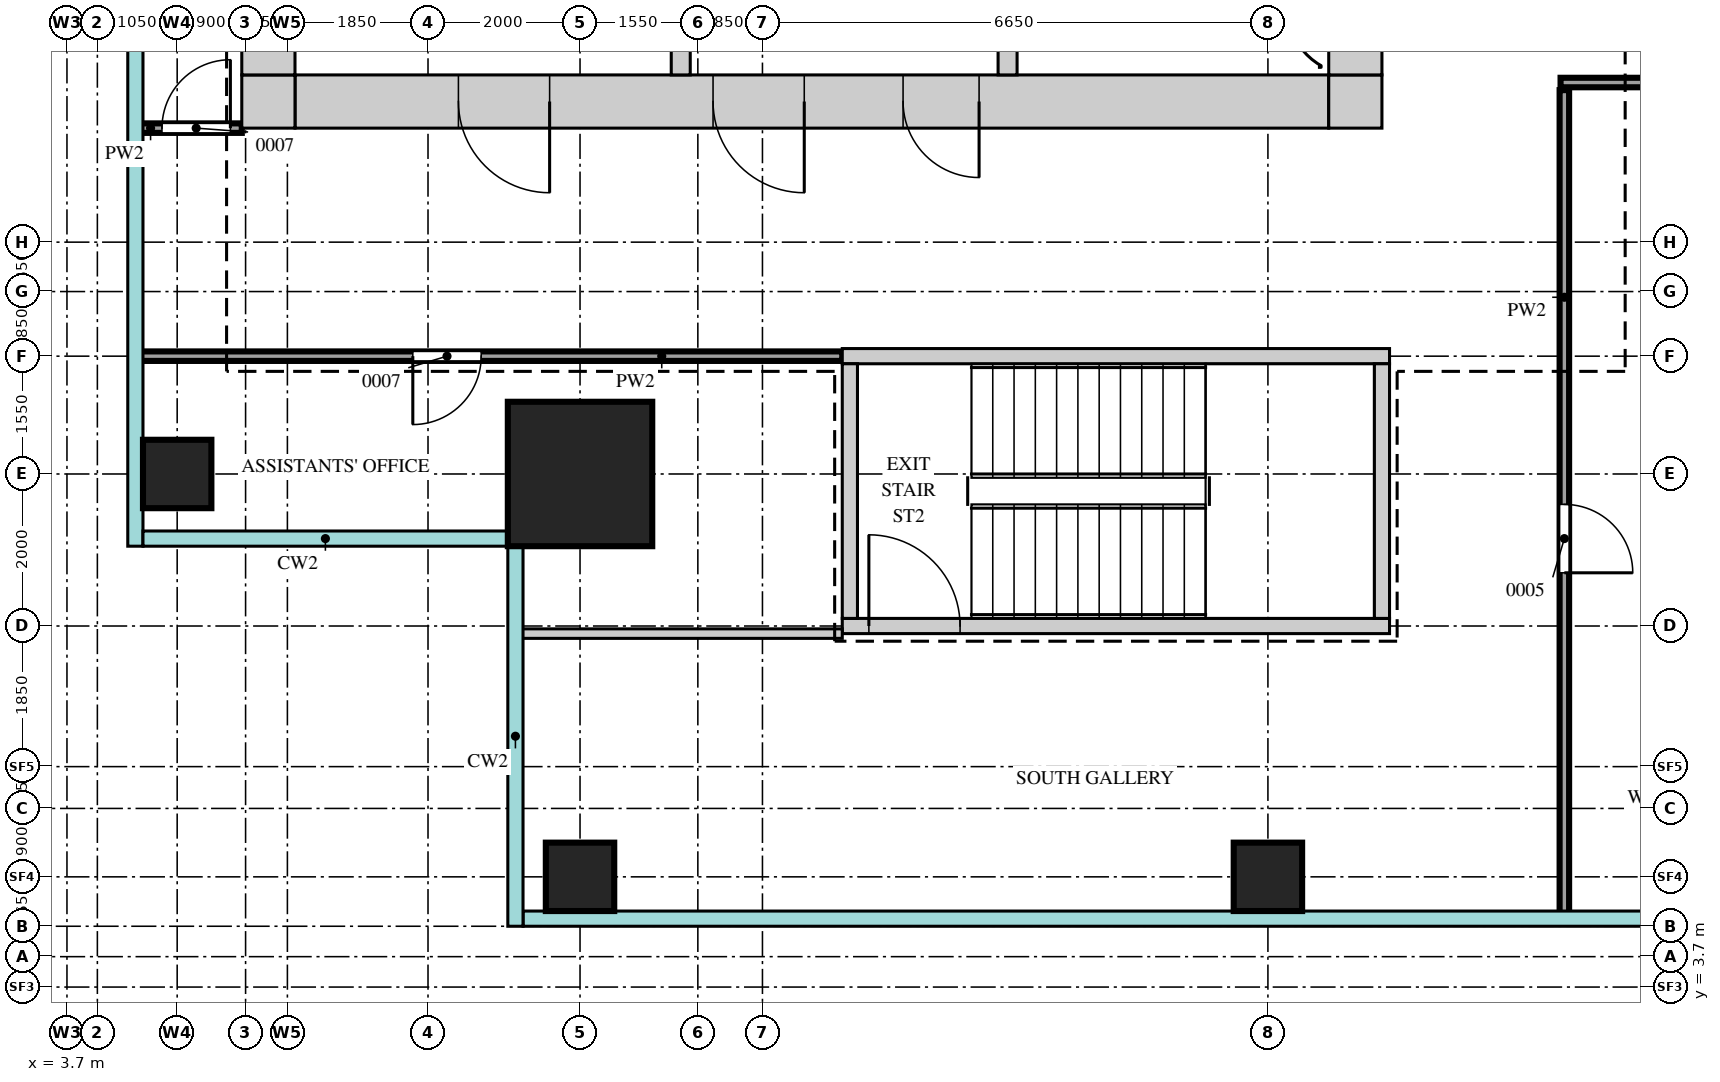
"""IFC4 building model, lengths in metres.
Left out: names, types, materials, properties, quantities, classifications, styles, units other than length and angle.
Written with IfcOpenShell. Run it as: python <this file> out.ifc"""

import sys

from ifc_helpers import new_model, si_unit, direction, frame, frame_2d, origin, origin_2d, place, context, subcontext, project, spatial, rectangle, extrude, source, transform, mapped, element, fill, save


model = new_model("IFC4")
c1 = context("Model", 3, precision=1e-05, world=origin(), true_north=direction((0.0, 1.0)))
c2 = subcontext(c1, "Body", "Model", "MODEL_VIEW")
j1 = project(units=[si_unit("LENGTHUNIT", "METRE"), si_unit("PLANEANGLEUNIT", "RADIAN")], contexts=[c1])
p1 = place(None, origin())
s1 = spatial("IfcSite", under=j1, at=p1, CompositionType="ELEMENT")
p2 = place(p1, origin())
s2 = spatial("IfcBuilding", under=s1, at=p2, CompositionType="ELEMENT")
p3 = place(p2, frame((0.0, 0.0, 270.2)))
s3 = spatial("IfcBuildingStorey", under=s2, at=p3, CompositionType="ELEMENT", Elevation=270.2)
m1 = source(origin(), c2, "Body", "SweptSolid", [
    extrude(rectangle(XDim=13.6, YDim=0.7, at=frame_2d((6.8, 0.0))), origin(), (0.0, 0.0, 1.0), 3.75),
])
p4 = place(p3, frame((6.7, 15.35, 0.0), z_axis=(0.0, 0.0, 1.0), x_axis=(1.0, 0.0, 0.0)))
e1 = element("IfcWall", 1, at=p4, inside=s3, PredefinedType="SHEAR", context=c2, shape_type="MappedRepresentation", body=[
    mapped(m1, transform((0.0, 0.0, 0.0))),
])
m2 = source(origin(), c2, "Body", "SweptSolid", [
    extrude(rectangle(XDim=1.2, YDim=2.1, at=frame_2d((0.6, 1.05))), frame((0.0, 0.36, 0.0), z_axis=(0.0, -1.0, 0.0), x_axis=(1.0, 0.0, 0.0)), (0.0, 0.0, 1.0), 0.72),
])
p5 = place(p4, frame((5.5, 0.0, 0.0)))
e2 = element("IfcOpeningElement", 2, at=p5, cuts=e1, PredefinedType="OPENING", context=c2, shape_type="MappedRepresentation", body=[
    mapped(m2, transform((0.0, 0.0, 0.0))),
])
p6 = place(p4, frame((2.15, 0.0, 0.0)))
e3 = element("IfcOpeningElement", 3, at=p6, cuts=e1, PredefinedType="OPENING", context=c2, shape_type="MappedRepresentation", body=[
    mapped(m2, transform((0.0, 0.0, 0.0))),
])
m3 = source(origin(), c2, "Body", "SweptSolid", [
    extrude(rectangle(XDim=1.0, YDim=2.1, at=frame_2d((0.5, 1.05))), frame((0.0, 0.36, 0.0), z_axis=(0.0, -1.0, 0.0), x_axis=(1.0, 0.0, 0.0)), (0.0, 0.0, 1.0), 0.72),
])
p7 = place(p4, frame((8.0, 0.0, 0.0)))
e4 = element("IfcOpeningElement", 4, at=p7, cuts=e1, PredefinedType="OPENING", context=c2, shape_type="MappedRepresentation", body=[
    mapped(m3, transform((0.0, 0.0, 0.0))),
])
m4 = source(origin(), c2, "Body", "SweptSolid", [
    extrude(rectangle(XDim=0.7, YDim=0.7, at=frame_2d((0.35, 0.0))), origin(), (0.0, 0.0, 1.0), 3.75),
])
for number, where, z_axis, x_axis in (
    (5, (20.3, 15.35, 0.0), (0.0, 0.0, 1.0), (1.0, 0.0, 0.0)),
    (6, (6.0, 15.35, 0.0), (0.0, 0.0, 1.0), (1.0, 0.0, 0.0)),
):
    element("IfcWall", number, at=place(p3, frame(where, z_axis=z_axis, x_axis=x_axis)), inside=s3, PredefinedType="SHEAR", context=c2, shape_type="MappedRepresentation", body=[
        mapped(m4, transform((0.0, 0.0, 0.0))),
    ])
m5 = source(origin(), c2, "Body", "SweptSolid", [
    extrude(rectangle(XDim=22.6, YDim=0.7, at=frame_2d((11.3, 0.0))), origin(), (0.0, 0.0, 1.0), 3.75),
])
p8 = place(p3, frame((20.65, 15.7, 0.0), z_axis=(0.0, 0.0, 1.0), x_axis=(0.0, 1.0, 0.0)))
e7 = element("IfcWall", 7, at=p8, inside=s3, PredefinedType="SHEAR", context=c2, shape_type="MappedRepresentation", body=[
    mapped(m5, transform((0.0, 0.0, 0.0))),
])
m6 = source(origin(), c2, "Body", "SweptSolid", [
    extrude(rectangle(XDim=1.8, YDim=2.1, at=frame_2d((0.9, 1.05))), frame((0.0, 0.36, 0.0), z_axis=(0.0, -1.0, 0.0), x_axis=(1.0, 0.0, 0.0)), (0.0, 0.0, 1.0), 0.72),
])
p9 = place(p8, frame((10.8, 0.0, 0.0)))
e8 = element("IfcOpeningElement", 8, at=p9, cuts=e7, PredefinedType="OPENING", context=c2, shape_type="MappedRepresentation", body=[
    mapped(m6, transform((0.0, 0.0, 0.0))),
])
m7 = source(origin(), c2, "Body", "SweptSolid", [
    extrude(rectangle(XDim=0.9, YDim=2.1, at=frame_2d((0.45, 1.05))), frame((0.0, 0.36, 0.0), z_axis=(0.0, -1.0, 0.0), x_axis=(1.0, 0.0, 0.0)), (0.0, 0.0, 1.0), 0.72),
])
p10 = place(p8, frame((0.45, 0.0, 0.0)))
e9 = element("IfcOpeningElement", 9, at=p10, cuts=e7, PredefinedType="OPENING", context=c2, shape_type="MappedRepresentation", body=[
    mapped(m7, transform((0.0, 0.0, 0.0))),
])
p11 = place(p8, frame((4.0, 0.0, 0.0)))
e10 = element("IfcOpeningElement", 10, at=p11, cuts=e7, PredefinedType="OPENING", context=c2, shape_type="MappedRepresentation", body=[
    mapped(m7, transform((0.0, 0.0, 0.0))),
])
p12 = place(p3, frame((6.35, 15.7, 0.0), z_axis=(0.0, 0.0, 1.0), x_axis=(0.0, 1.0, 0.0)))
e11 = element("IfcWall", 11, at=p12, inside=s3, PredefinedType="SHEAR", context=c2, shape_type="MappedRepresentation", body=[
    mapped(m5, transform((0.0, 0.0, 0.0))),
])
m8 = source(origin(), c2, "Body", "SweptSolid", [
    extrude(rectangle(XDim=7.2, YDim=0.2, at=frame_2d((3.6, 0.0))), origin(), (0.0, 0.0, 1.0), 3.75),
])
p13 = place(p3, frame((13.9, 12.0, 0.0), z_axis=(0.0, 0.0, 1.0), x_axis=(1.0, 0.0, 0.0)))
e12 = element("IfcWall", 12, at=p13, inside=s3, PredefinedType="SHEAR", context=c2, shape_type="MappedRepresentation", body=[
    mapped(m8, transform((0.0, 0.0, 0.0))),
])
p14 = place(p3, frame((13.9, 8.45, 0.0), z_axis=(0.0, 0.0, 1.0), x_axis=(1.0, 0.0, 0.0)))
e13 = element("IfcWall", 13, at=p14, inside=s3, PredefinedType="SHEAR", context=c2, shape_type="MappedRepresentation", body=[
    mapped(m8, transform((0.0, 0.0, 0.0))),
])
m9 = source(origin(), c2, "Body", "SweptSolid", [
    extrude(rectangle(XDim=1.2, YDim=2.1, at=frame_2d((0.6, 1.05))), frame((0.0, 0.11, 0.0), z_axis=(0.0, -1.0, 0.0), x_axis=(1.0, 0.0, 0.0)), (0.0, 0.0, 1.0), 0.22),
])
p15 = place(p14, frame((0.35, 0.0, 0.0)))
e14 = element("IfcOpeningElement", 14, at=p15, cuts=e13, PredefinedType="OPENING", context=c2, shape_type="MappedRepresentation", body=[
    mapped(m9, transform((0.0, 0.0, 0.0))),
])
m10 = source(origin(), c2, "Body", "SweptSolid", [
    extrude(rectangle(XDim=3.35, YDim=0.2, at=frame_2d((1.675, 0.0))), origin(), (0.0, 0.0, 1.0), 3.75),
])
for number, where, z_axis, x_axis in (
    (15, (21.0, 8.55, 0.0), (0.0, 0.0, 1.0), (0.0, 1.0, 0.0)),
    (16, (14.0, 8.55, 0.0), (0.0, 0.0, 1.0), (0.0, 1.0, 0.0)),
):
    element("IfcWall", number, at=place(p3, frame(where, z_axis=z_axis, x_axis=x_axis)), inside=s3, PredefinedType="SHEAR", context=c2, shape_type="MappedRepresentation", body=[
        mapped(m10, transform((0.0, 0.0, 0.0))),
    ])
m11 = source(origin(), c2, "Body", "SweptSolid", [
    extrude(rectangle(XDim=3.5, YDim=0.25, at=frame_2d((1.75, 0.0))), origin(), (0.0, 0.0, 1.0), 3.75),
])
for number, where, z_axis, x_axis in (
    (17, (16.075, 15.7, 0.0), (0.0, 0.0, 1.0), (0.0, 1.0, 0.0)),
    (18, (11.775, 15.7, 0.0), (0.0, 0.0, 1.0), (0.0, 1.0, 0.0)),
):
    element("IfcWall", number, at=place(p3, frame(where, z_axis=z_axis, x_axis=x_axis)), inside=s3, PredefinedType="STANDARD", context=c2, shape_type="MappedRepresentation", body=[
        mapped(m11, transform((0.0, 0.0, 0.0))),
    ])
m12 = source(origin(), c2, "Body", "SweptSolid", [
    extrude(rectangle(XDim=1.9, YDim=1.9, at=origin_2d()), origin(), (0.0, 0.0, 1.0), 4.0),
])
p16 = place(p3, frame((10.45, 10.45, 0.0), z_axis=(0.0, 0.0, 1.0), x_axis=(1.0, 0.0, 0.0)))
e19 = element("IfcColumn", 19, at=p16, inside=s3, PredefinedType="COLUMN", context=c2, shape_type="MappedRepresentation", body=[
    mapped(m12, transform((0.0, 0.0, 0.0))),
])
m13 = source(origin(), c2, "Body", "SweptSolid", [
    extrude(rectangle(XDim=0.9, YDim=0.9, at=origin_2d()), origin(), (0.0, 0.0, 1.0), 4.0),
])
for number, where, z_axis, x_axis in (
    (20, (10.45, 5.15, 0.0), (0.0, 0.0, 1.0), (1.0, 0.0, 0.0)),
    (21, (19.5, 5.15, 0.0), (0.0, 0.0, 1.0), (1.0, 0.0, 0.0)),
    (22, (5.15, 10.45, 0.0), (0.0, 0.0, 1.0), (1.0, 0.0, 0.0)),
):
    element("IfcColumn", number, at=place(p3, frame(where, z_axis=z_axis, x_axis=x_axis)), inside=s3, PredefinedType="COLUMN", context=c2, shape_type="MappedRepresentation", body=[
        mapped(m13, transform((0.0, 0.0, 0.0))),
    ])
m14 = source(origin(), c2, "Body", "SweptSolid", [
    extrude(rectangle(XDim=10.85, YDim=0.125, at=frame_2d((5.425, 0.0))), origin(), (0.0, 0.0, 1.0), 3.8),
])
p17 = place(p3, frame((23.4, 4.65, 0.0), z_axis=(0.0, 0.0, 1.0), x_axis=(0.0, 1.0, 0.0)))
e23 = element("IfcWall", 23, at=p17, inside=s3, PredefinedType="PARTITIONING", context=c2, shape_type="MappedRepresentation", body=[
    mapped(m14, transform((0.0, 0.0, 0.0))),
])
m15 = source(origin(), c2, "Body", "SweptSolid", [
    extrude(rectangle(XDim=0.9, YDim=2.1, at=frame_2d((0.45, 1.05))), frame((0.0, 0.073, 0.0), z_axis=(0.0, -1.0, 0.0), x_axis=(1.0, 0.0, 0.0)), (0.0, 0.0, 1.0), 0.145),
])
p18 = place(p17, frame((4.5, 0.0, 0.0)))
e24 = element("IfcOpeningElement", 24, at=p18, cuts=e23, PredefinedType="OPENING", context=c2, shape_type="MappedRepresentation", body=[
    mapped(m15, transform((0.0, 0.0, 0.0))),
])
m16 = source(origin(), c2, "Body", "SweptSolid", [
    extrude(rectangle(XDim=4.25, YDim=0.125, at=frame_2d((2.125, 0.0))), origin(), (0.0, 0.0, 1.0), 3.8),
])
p19 = place(p3, frame((9.65, 8.35, 0.0), z_axis=(0.0, 0.0, 1.0), x_axis=(1.0, 0.0, 0.0)))
e25 = element("IfcWall", 25, at=p19, inside=s3, PredefinedType="PARTITIONING", context=c2, shape_type="MappedRepresentation", body=[
    mapped(m16, transform((0.0, 0.0, 0.0))),
])
m17 = source(origin(), c2, "Body", "SweptSolid", [
    extrude(rectangle(XDim=9.25, YDim=0.125, at=frame_2d((4.625, 0.0))), origin(), (0.0, 0.0, 1.0), 3.8),
])
p20 = place(p3, frame((4.65, 12.0, 0.0), z_axis=(0.0, 0.0, 1.0), x_axis=(1.0, 0.0, 0.0)))
e26 = element("IfcWall", 26, at=p20, inside=s3, PredefinedType="PARTITIONING", context=c2, shape_type="MappedRepresentation", body=[
    mapped(m17, transform((0.0, 0.0, 0.0))),
])
p21 = place(p20, frame((3.6, 0.0, 0.0)))
e27 = element("IfcOpeningElement", 27, at=p21, cuts=e26, PredefinedType="OPENING", context=c2, shape_type="MappedRepresentation", body=[
    mapped(m15, transform((0.0, 0.0, 0.0))),
])
m18 = source(origin(), c2, "Body", "SweptSolid", [
    extrude(rectangle(XDim=1.35, YDim=0.125, at=frame_2d((0.675, 0.0))), origin(), (0.0, 0.0, 1.0), 3.8),
])
p22 = place(p3, frame((4.65, 15.0, 0.0), z_axis=(0.0, 0.0, 1.0), x_axis=(1.0, 0.0, 0.0)))
e28 = element("IfcWall", 28, at=p22, inside=s3, PredefinedType="PARTITIONING", context=c2, shape_type="MappedRepresentation", body=[
    mapped(m18, transform((0.0, 0.0, 0.0))),
])
p23 = place(p22, frame((0.3, 0.0, 0.0)))
e29 = element("IfcOpeningElement", 29, at=p23, cuts=e28, PredefinedType="OPENING", context=c2, shape_type="MappedRepresentation", body=[
    mapped(m15, transform((0.0, 0.0, 0.0))),
])
m19 = source(origin(), c2, "Body", "SweptSolid", [
    extrude(rectangle(XDim=26.0, YDim=0.125, at=frame_2d((13.0, 0.0))), origin(), (0.0, 0.0, 1.0), 3.8),
])
p24 = place(p3, frame((23.35, 15.6, 0.0), z_axis=(0.0, 0.0, 1.0), x_axis=(1.0, 0.0, 0.0)))
e30 = element("IfcWall", 30, at=p24, inside=s3, PredefinedType="PARTITIONING", context=c2, shape_type="MappedRepresentation", body=[
    mapped(m19, transform((0.0, 0.0, 0.0))),
])
p25 = place(p24, frame((4.05, 0.0, 0.0)))
e31 = element("IfcOpeningElement", 31, at=p25, cuts=e30, PredefinedType="OPENING", context=c2, shape_type="MappedRepresentation", body=[
    mapped(m15, transform((0.0, 0.0, 0.0))),
])
m20 = source(origin(), c2, "Body", "SweptSolid", [
    extrude(rectangle(XDim=1.0, YDim=2.1, at=frame_2d((0.5, 1.05))), frame((0.0, 0.073, 0.0), z_axis=(0.0, -1.0, 0.0), x_axis=(1.0, 0.0, 0.0)), (0.0, 0.0, 1.0), 0.145),
])
p26 = place(p24, frame((6.85, 0.0, 0.0)))
e32 = element("IfcOpeningElement", 32, at=p26, cuts=e30, PredefinedType="OPENING", context=c2, shape_type="MappedRepresentation", body=[
    mapped(m20, transform((0.0, 0.0, 0.0))),
])
p27 = place(p24, frame((12.3, 0.0, 0.0)))
e33 = element("IfcOpeningElement", 33, at=p27, cuts=e30, PredefinedType="OPENING", context=c2, shape_type="MappedRepresentation", body=[
    mapped(m15, transform((0.0, 0.0, 0.0))),
])
m21 = source(origin(), c2, "Body", "SweptSolid", [
    extrude(rectangle(XDim=1.2, YDim=2.1, at=frame_2d((0.6, 1.05))), frame((0.0, 0.073, 0.0), z_axis=(0.0, -1.0, 0.0), x_axis=(1.0, 0.0, 0.0)), (0.0, 0.0, 1.0), 0.145),
])
p28 = place(p24, frame((20.8, 0.0, 0.0)))
e34 = element("IfcOpeningElement", 34, at=p28, cuts=e30, PredefinedType="OPENING", context=c2, shape_type="MappedRepresentation", body=[
    mapped(m21, transform((0.0, 0.0, 0.0))),
])
m22 = source(origin(), c2, "Body", "SweptSolid", [
    extrude(rectangle(XDim=1.2, YDim=2.1, at=frame_2d((0.6, 1.05))), frame((0.0, 0.3, 0.0), z_axis=(0.0, -1.0, 0.0), x_axis=(1.0, 0.0, 0.0)), (0.0, 0.0, 1.0), 0.6),
])
p29 = place(p5, origin())
e35 = element("IfcDoor", 35, at=p29, inside=s3, OperationType="SINGLE_SWING_RIGHT", PredefinedType="DOOR", context=c2, shape_type="MappedRepresentation", body=[
    mapped(m22, transform((0.0, 0.0, 0.0))),
])
fill(e2, e35)
p30 = place(p6, origin())
e36 = element("IfcDoor", 36, at=p30, inside=s3, OperationType="SINGLE_SWING_RIGHT", PredefinedType="DOOR", context=c2, shape_type="MappedRepresentation", body=[
    mapped(m22, transform((0.0, 0.0, 0.0))),
])
fill(e3, e36)
m23 = source(origin(), c2, "Body", "SweptSolid", [
    extrude(rectangle(XDim=1.0, YDim=2.1, at=frame_2d((0.5, 1.05))), frame((0.0, 0.3, 0.0), z_axis=(0.0, -1.0, 0.0), x_axis=(1.0, 0.0, 0.0)), (0.0, 0.0, 1.0), 0.6),
])
p31 = place(p7, origin())
e37 = element("IfcDoor", 37, at=p31, inside=s3, OperationType="SINGLE_SWING_RIGHT", PredefinedType="DOOR", context=c2, shape_type="MappedRepresentation", body=[
    mapped(m23, transform((0.0, 0.0, 0.0))),
])
fill(e4, e37)
m24 = source(origin(), c2, "Body", "SweptSolid", [
    extrude(rectangle(XDim=0.9, YDim=2.1, at=frame_2d((0.45, 1.05))), frame((0.0, 0.025, 0.0), z_axis=(0.0, -1.0, 0.0), x_axis=(1.0, 0.0, 0.0)), (0.0, 0.0, 1.0), 0.05),
])
p32 = place(p23, origin())
e38 = element("IfcDoor", 38, at=p32, inside=s3, OperationType="SINGLE_SWING_LEFT", PredefinedType="DOOR", context=c2, shape_type="MappedRepresentation", body=[
    mapped(m24, transform((0.0, 0.0, 0.0))),
])
fill(e29, e38)
p33 = place(p21, origin())
e39 = element("IfcDoor", 39, at=p33, inside=s3, OperationType="SINGLE_SWING_LEFT", PredefinedType="DOOR", context=c2, shape_type="MappedRepresentation", body=[
    mapped(m24, transform((0.0, 0.0, 0.0))),
])
fill(e27, e39)
p34 = place(p18, origin())
e40 = element("IfcDoor", 40, at=p34, inside=s3, OperationType="SINGLE_SWING_LEFT", PredefinedType="DOOR", context=c2, shape_type="MappedRepresentation", body=[
    mapped(m24, transform((0.0, 0.0, 0.0))),
])
fill(e24, e40)
m25 = source(origin(), c2, "Body", "SweptSolid", [
    extrude(rectangle(XDim=1.2, YDim=2.1, at=frame_2d((0.6, 1.05))), frame((0.0, 0.025, 0.0), z_axis=(0.0, -1.0, 0.0), x_axis=(1.0, 0.0, 0.0)), (0.0, 0.0, 1.0), 0.05),
])
p35 = place(p15, origin())
e41 = element("IfcDoor", 41, at=p35, inside=s3, OperationType="SINGLE_SWING_RIGHT", PredefinedType="DOOR", context=c2, shape_type="MappedRepresentation", body=[
    mapped(m25, transform((0.0, 0.0, 0.0))),
])
fill(e14, e41)
save(model, sys.argv[1])
